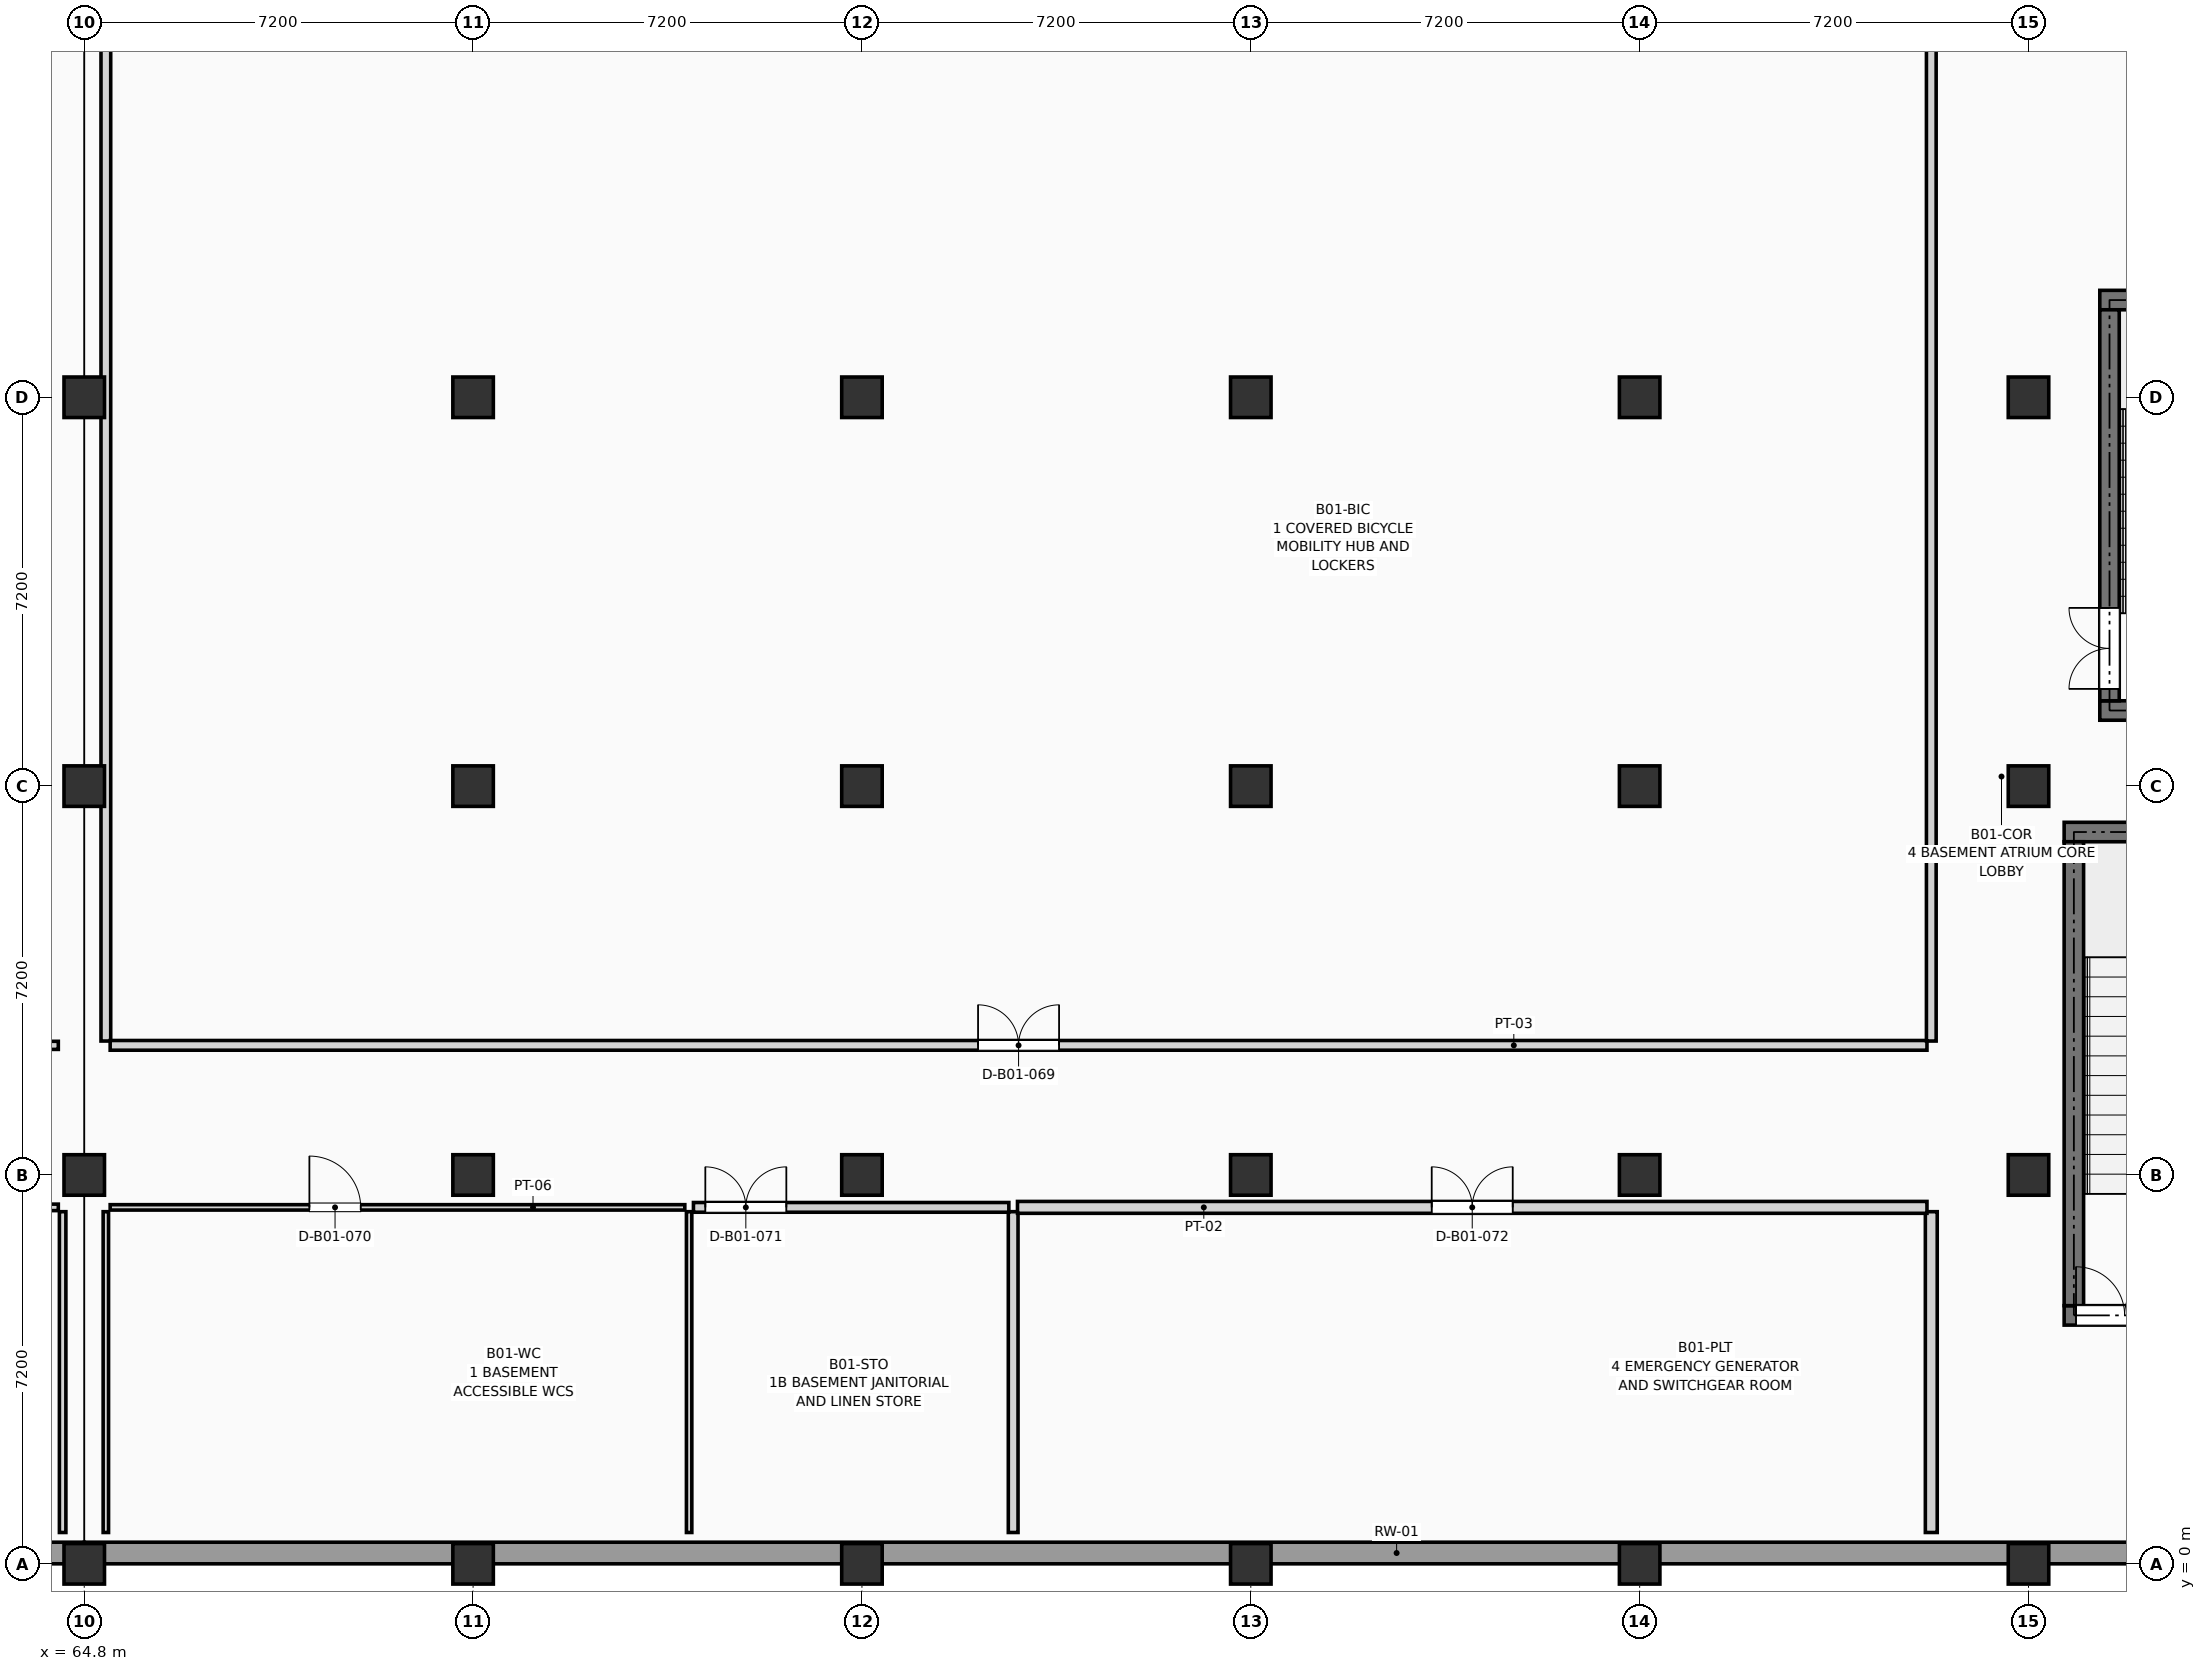
"""IFC4 building model, lengths in metres.
Left out: names, types, materials, properties, quantities, classifications, styles, units other than length and angle.
Written with IfcOpenShell. Run it as: python <this file> out.ifc"""

import sys

from ifc_helpers import new_model, si_unit, direction, frame, frame_2d, origin, origin_2d, place, context, subcontext, project, spatial, rectangle, extrude, element, fill, save


model = new_model("IFC4")
c1 = context("Model", 3, precision=1e-05, world=origin(), true_north=direction((0.0, 1.0)))
c2 = subcontext(c1, "Body", "Model", "MODEL_VIEW")
j1 = project(units=[si_unit("LENGTHUNIT", "METRE"), si_unit("PLANEANGLEUNIT", "RADIAN")], contexts=[c1])
p1 = place(None, origin())
s1 = spatial("IfcSite", under=j1, at=p1, CompositionType="ELEMENT")
p2 = place(p1, origin())
s2 = spatial("IfcBuilding", under=s1, at=p2, CompositionType="ELEMENT")
p3 = place(p2, frame((0.0, 0.0, -4.5)))
s3 = spatial("IfcBuildingStorey", under=s2, at=p3, CompositionType="ELEMENT", Elevation=-4.5)
for number, where, z_axis, x_axis in (
    (1, (64.8, 0.0, -0.3), (0.0, 0.0, 1.0), (1.0, 0.0, 0.0)),
    (2, (64.8, 7.2, -0.3), (0.0, 0.0, 1.0), (1.0, 0.0, 0.0)),
    (3, (64.8, 14.4, -0.3), (0.0, 0.0, 1.0), (1.0, 0.0, 0.0)),
    (4, (64.8, 21.6, -0.3), (0.0, 0.0, 1.0), (1.0, 0.0, 0.0)),
    (5, (72.0, 0.0, -0.3), (0.0, 0.0, 1.0), (1.0, 0.0, 0.0)),
    (6, (72.0, 7.2, -0.3), (0.0, 0.0, 1.0), (1.0, 0.0, 0.0)),
    (7, (72.0, 14.4, -0.3), (0.0, 0.0, 1.0), (1.0, 0.0, 0.0)),
    (8, (72.0, 21.6, -0.3), (0.0, 0.0, 1.0), (1.0, 0.0, 0.0)),
    (9, (79.2, 0.0, -0.3), (0.0, 0.0, 1.0), (1.0, 0.0, 0.0)),
    (10, (79.2, 7.2, -0.3), (0.0, 0.0, 1.0), (1.0, 0.0, 0.0)),
    (11, (79.2, 14.4, -0.3), (0.0, 0.0, 1.0), (1.0, 0.0, 0.0)),
    (12, (79.2, 21.6, -0.3), (0.0, 0.0, 1.0), (1.0, 0.0, 0.0)),
    (13, (86.4, 0.0, -0.3), (0.0, 0.0, 1.0), (1.0, 0.0, 0.0)),
    (14, (86.4, 7.2, -0.3), (0.0, 0.0, 1.0), (1.0, 0.0, 0.0)),
    (15, (86.4, 14.4, -0.3), (0.0, 0.0, 1.0), (1.0, 0.0, 0.0)),
    (16, (86.4, 21.6, -0.3), (0.0, 0.0, 1.0), (1.0, 0.0, 0.0)),
    (17, (93.6, 0.0, -0.3), (0.0, 0.0, 1.0), (1.0, 0.0, 0.0)),
    (18, (93.6, 7.2, -0.3), (0.0, 0.0, 1.0), (1.0, 0.0, 0.0)),
    (19, (93.6, 14.4, -0.3), (0.0, 0.0, 1.0), (1.0, 0.0, 0.0)),
    (20, (93.6, 21.6, -0.3), (0.0, 0.0, 1.0), (1.0, 0.0, 0.0)),
    (21, (100.8, 0.0, -0.3), (0.0, 0.0, 1.0), (1.0, 0.0, 0.0)),
):
    element("IfcColumn", number, at=place(p3, frame(where, z_axis=z_axis, x_axis=x_axis)), inside=s3, PredefinedType="COLUMN", context=c2, shape_type="SweptSolid", body=[
        extrude(rectangle(XDim=0.75, YDim=0.75, at=origin_2d()), origin(), (0.0, 0.0, 1.0), 4.8),
    ])
for number, where, z_axis, x_axis in (
    (22, (100.8, 7.2, 0.0), (0.0, 0.0, 1.0), (1.0, 0.0, 0.0)),
    (23, (100.8, 14.4, 0.0), (0.0, 0.0, 1.0), (1.0, 0.0, 0.0)),
    (24, (100.8, 21.6, 0.0), (0.0, 0.0, 1.0), (1.0, 0.0, 0.0)),
):
    element("IfcColumn", number, at=place(p3, frame(where, z_axis=z_axis, x_axis=x_axis)), inside=s3, PredefinedType="COLUMN", context=c2, shape_type="SweptSolid", body=[
        extrude(rectangle(XDim=0.75, YDim=0.75, at=origin_2d()), origin(), (0.0, 0.0, 1.0), 4.5),
    ])
p4 = place(p3, frame((115.2, 0.2, -0.3), z_axis=(0.0, 0.0, 1.0), x_axis=(-1.0, 0.0, 0.0)))
e25 = element("IfcWall", 25, at=p4, inside=s3, PredefinedType="USERDEFINED", context=c2, shape_type="SweptSolid", body=[
    extrude(rectangle(XDim=50.4, YDim=0.4, at=frame_2d((25.2, 0.0))), origin(), (0.0, 0.0, 1.0), 4.54),
])
p5 = place(p3, frame((64.8, 0.2, -0.3), z_axis=(0.0, 0.0, 1.0), x_axis=(-1.0, 0.0, 0.0)))
e26 = element("IfcWall", 26, at=p5, inside=s3, PredefinedType="USERDEFINED", context=c2, shape_type="SweptSolid", body=[
    extrude(rectangle(XDim=36.0, YDim=0.4, at=frame_2d((18.0, 0.0))), origin(), (0.0, 0.0, 1.0), 4.54),
])
for number, where, z_axis, x_axis in (
    (27, (102.12, 15.8, -0.3), (0.0, 0.0, 1.0), (1.0, 0.0, 0.0)),
    (28, (102.12, 23.4, -0.3), (0.0, 0.0, 1.0), (1.0, 0.0, 0.0)),
):
    element("IfcWall", number, at=place(p3, frame(where, z_axis=z_axis, x_axis=x_axis)), inside=s3, PredefinedType="SHEAR", context=c2, shape_type="SweptSolid", body=[
        extrude(rectangle(XDim=4.48, YDim=0.36, at=frame_2d((2.24, 0.0))), origin(), (0.0, 0.0, 1.0), 4.54),
    ])
p6 = place(p3, frame((102.3, 15.98, -0.3), z_axis=(0.0, 0.0, 1.0), x_axis=(0.0, 1.0, 0.0)))
e29 = element("IfcWall", 29, at=p6, inside=s3, PredefinedType="SHEAR", context=c2, shape_type="SweptSolid", body=[
    extrude(rectangle(XDim=7.24, YDim=0.36, at=frame_2d((3.62, 0.0))), origin(), (0.0, 0.0, 1.0), 4.54),
])
p7 = place(p6, frame((0.22, 0.0, 0.3)))
e30 = element("IfcOpeningElement", 30, at=p7, cuts=e29, PredefinedType="OPENING", context=c2, shape_type="SweptSolid", body=[
    extrude(rectangle(XDim=1.5, YDim=2.2, at=frame_2d((0.75, 1.1))), frame((0.0, 0.192, 0.0), z_axis=(0.0, -1.0, 0.0), x_axis=(1.0, 0.0, 0.0)), (0.0, 0.0, 1.0), 0.384),
])
p8 = place(p3, frame((101.46, 4.6, -0.3), z_axis=(0.0, 0.0, 1.0), x_axis=(1.0, 0.0, 0.0)))
e31 = element("IfcWall", 31, at=p8, inside=s3, PredefinedType="SHEAR", context=c2, shape_type="SweptSolid", body=[
    extrude(rectangle(XDim=5.88, YDim=0.36, at=frame_2d((2.94, 0.0))), origin(), (0.0, 0.0, 1.0), 4.54),
])
p9 = place(p8, frame((0.22, 0.0, 0.3)))
e32 = element("IfcOpeningElement", 32, at=p9, cuts=e31, PredefinedType="OPENING", context=c2, shape_type="SweptSolid", body=[
    extrude(rectangle(XDim=1.8, YDim=2.2, at=frame_2d((0.9, 1.1))), frame((0.0, 0.192, 0.0), z_axis=(0.0, -1.0, 0.0), x_axis=(1.0, 0.0, 0.0)), (0.0, 0.0, 1.0), 0.384),
])
p10 = place(p3, frame((101.46, 13.55, -0.3), z_axis=(0.0, 0.0, 1.0), x_axis=(1.0, 0.0, 0.0)))
e33 = element("IfcWall", 33, at=p10, inside=s3, PredefinedType="SHEAR", context=c2, shape_type="SweptSolid", body=[
    extrude(rectangle(XDim=5.88, YDim=0.36, at=frame_2d((2.94, 0.0))), origin(), (0.0, 0.0, 1.0), 4.54),
])
p11 = place(p3, frame((101.64, 4.78, -0.3), z_axis=(0.0, 0.0, 1.0), x_axis=(0.0, 1.0, 0.0)))
e34 = element("IfcWall", 34, at=p11, inside=s3, PredefinedType="SHEAR", context=c2, shape_type="SweptSolid", body=[
    extrude(rectangle(XDim=8.59, YDim=0.36, at=frame_2d((4.295, 0.0))), origin(), (0.0, 0.0, 1.0), 4.54),
])
p12 = place(p3, frame((46.88, 9.6, 0.0), z_axis=(0.0, 0.0, 1.0), x_axis=(1.0, 0.0, 0.0)))
e35 = element("IfcWall", 35, at=p12, inside=s3, PredefinedType="PARTITIONING", context=c2, shape_type="SweptSolid", body=[
    extrude(rectangle(XDim=17.44, YDim=0.15, at=frame_2d((8.72, 0.0))), origin(), (0.0, 0.0, 1.0), 4.225),
])
p13 = place(p12, frame((7.97, 0.0, 0.0)))
e36 = element("IfcOpeningElement", 36, at=p13, cuts=e35, PredefinedType="OPENING", context=c2, shape_type="SweptSolid", body=[
    extrude(rectangle(XDim=1.5, YDim=2.2, at=frame_2d((0.75, 1.1))), frame((0.0, 0.087, 0.0), z_axis=(0.0, -1.0, 0.0), x_axis=(1.0, 0.0, 0.0)), (0.0, 0.0, 1.0), 0.174),
])
p14 = place(p3, frame((64.4, 0.58, 0.0), z_axis=(0.0, 0.0, 1.0), x_axis=(0.0, 1.0, 0.0)))
e37 = element("IfcWall", 37, at=p14, inside=s3, PredefinedType="PARTITIONING", context=c2, shape_type="SweptSolid", body=[
    extrude(rectangle(XDim=5.94, YDim=0.12, at=frame_2d((2.97, 0.0))), origin(), (0.0, 0.0, 1.0), 3.375),
])
p15 = place(p3, frame((15.88, 6.6, 0.0), z_axis=(0.0, 0.0, 1.0), x_axis=(1.0, 0.0, 0.0)))
e38 = element("IfcWall", 38, at=p15, inside=s3, PredefinedType="PARTITIONING", context=c2, shape_type="SweptSolid", body=[
    extrude(rectangle(XDim=48.44, YDim=0.12, at=frame_2d((24.22, 0.0))), origin(), (0.0, 0.0, 1.0), 4.225),
])
p16 = place(p3, frame((65.2, 9.68, 0.0), z_axis=(0.0, 0.0, 1.0), x_axis=(0.0, 1.0, 0.0)))
e39 = element("IfcWall", 39, at=p16, inside=s3, PredefinedType="PARTITIONING", context=c2, shape_type="SweptSolid", body=[
    extrude(rectangle(XDim=18.44, YDim=0.18, at=frame_2d((9.22, 0.0))), origin(), (0.0, 0.0, 1.0), 3.375),
])
p17 = place(p3, frame((65.28, 9.6, 0.0), z_axis=(0.0, 0.0, 1.0), x_axis=(1.0, 0.0, 0.0)))
e40 = element("IfcWall", 40, at=p17, inside=s3, PredefinedType="PARTITIONING", context=c2, shape_type="SweptSolid", body=[
    extrude(rectangle(XDim=33.64, YDim=0.18, at=frame_2d((16.82, 0.0))), origin(), (0.0, 0.0, 1.0), 4.225),
])
p18 = place(p17, frame((16.07, 0.0, 0.0)))
e41 = element("IfcOpeningElement", 41, at=p18, cuts=e40, PredefinedType="OPENING", context=c2, shape_type="SweptSolid", body=[
    extrude(rectangle(XDim=1.5, YDim=2.25, at=frame_2d((0.75, 1.125))), frame((0.0, 0.102, 0.0), z_axis=(0.0, -1.0, 0.0), x_axis=(1.0, 0.0, 0.0)), (0.0, 0.0, 1.0), 0.204),
])
p19 = place(p3, frame((99.0, 9.68, 0.0), z_axis=(0.0, 0.0, 1.0), x_axis=(0.0, 1.0, 0.0)))
e42 = element("IfcWall", 42, at=p19, inside=s3, PredefinedType="PARTITIONING", context=c2, shape_type="SweptSolid", body=[
    extrude(rectangle(XDim=18.44, YDim=0.18, at=frame_2d((9.22, 0.0))), origin(), (0.0, 0.0, 1.0), 4.225),
])
p20 = place(p3, frame((65.2, 0.58, 0.0), z_axis=(0.0, 0.0, 1.0), x_axis=(0.0, 1.0, 0.0)))
e43 = element("IfcWall", 43, at=p20, inside=s3, PredefinedType="PARTITIONING", context=c2, shape_type="SweptSolid", body=[
    extrude(rectangle(XDim=5.94, YDim=0.1, at=frame_2d((2.97, 0.0))), origin(), (0.0, 0.0, 1.0), 3.375),
])
p21 = place(p3, frame((76.0, 0.58, 0.0), z_axis=(0.0, 0.0, 1.0), x_axis=(0.0, 1.0, 0.0)))
e44 = element("IfcWall", 44, at=p21, inside=s3, PredefinedType="PARTITIONING", context=c2, shape_type="SweptSolid", body=[
    extrude(rectangle(XDim=5.94, YDim=0.1, at=frame_2d((2.97, 0.0))), origin(), (0.0, 0.0, 1.0), 4.225),
])
p22 = place(p3, frame((65.28, 6.6, 0.0), z_axis=(0.0, 0.0, 1.0), x_axis=(1.0, 0.0, 0.0)))
e45 = element("IfcWall", 45, at=p22, inside=s3, PredefinedType="PARTITIONING", context=c2, shape_type="SweptSolid", body=[
    extrude(rectangle(XDim=10.64, YDim=0.1, at=frame_2d((5.32, 0.0))), origin(), (0.0, 0.0, 1.0), 4.225),
])
p23 = place(p22, frame((3.689, 0.0, 0.0)))
e46 = element("IfcOpeningElement", 46, at=p23, cuts=e45, PredefinedType="OPENING", context=c2, shape_type="SweptSolid", body=[
    extrude(rectangle(XDim=0.95, YDim=2.1, at=frame_2d((0.475, 1.05))), frame((0.0, 0.062, 0.0), z_axis=(0.0, -1.0, 0.0), x_axis=(1.0, 0.0, 0.0)), (0.0, 0.0, 1.0), 0.124),
])
p24 = place(p3, frame((82.0, 0.58, 0.0), z_axis=(0.0, 0.0, 1.0), x_axis=(0.0, 1.0, 0.0)))
e47 = element("IfcWall", 47, at=p24, inside=s3, PredefinedType="PARTITIONING", context=c2, shape_type="SweptSolid", body=[
    extrude(rectangle(XDim=5.94, YDim=0.18, at=frame_2d((2.97, 0.0))), origin(), (0.0, 0.0, 1.0), 4.225),
])
p25 = place(p3, frame((76.08, 6.6, 0.0), z_axis=(0.0, 0.0, 1.0), x_axis=(1.0, 0.0, 0.0)))
e48 = element("IfcWall", 48, at=p25, inside=s3, PredefinedType="PARTITIONING", context=c2, shape_type="SweptSolid", body=[
    extrude(rectangle(XDim=5.84, YDim=0.18, at=frame_2d((2.92, 0.0))), origin(), (0.0, 0.0, 1.0), 4.225),
])
p26 = place(p25, frame((0.22, 0.0, 0.0)))
e49 = element("IfcOpeningElement", 49, at=p26, cuts=e48, PredefinedType="OPENING", context=c2, shape_type="SweptSolid", body=[
    extrude(rectangle(XDim=1.5, YDim=2.25, at=frame_2d((0.75, 1.125))), frame((0.0, 0.102, 0.0), z_axis=(0.0, -1.0, 0.0), x_axis=(1.0, 0.0, 0.0)), (0.0, 0.0, 1.0), 0.204),
])
p27 = place(p3, frame((99.0, 0.58, 0.0), z_axis=(0.0, 0.0, 1.0), x_axis=(0.0, 1.0, 0.0)))
e50 = element("IfcWall", 50, at=p27, inside=s3, PredefinedType="PARTITIONING", context=c2, shape_type="SweptSolid", body=[
    extrude(rectangle(XDim=5.94, YDim=0.22, at=frame_2d((2.97, 0.0))), origin(), (0.0, 0.0, 1.0), 4.225),
])
p28 = place(p3, frame((82.08, 6.6, 0.0), z_axis=(0.0, 0.0, 1.0), x_axis=(1.0, 0.0, 0.0)))
e51 = element("IfcWall", 51, at=p28, inside=s3, PredefinedType="PARTITIONING", context=c2, shape_type="SweptSolid", body=[
    extrude(rectangle(XDim=16.84, YDim=0.22, at=frame_2d((8.42, 0.0))), origin(), (0.0, 0.0, 1.0), 4.225),
])
p29 = place(p28, frame((7.67, 0.0, 0.0)))
e52 = element("IfcOpeningElement", 52, at=p29, cuts=e51, PredefinedType="OPENING", context=c2, shape_type="SweptSolid", body=[
    extrude(rectangle(XDim=1.5, YDim=2.25, at=frame_2d((0.75, 1.125))), frame((0.0, 0.122, 0.0), z_axis=(0.0, -1.0, 0.0), x_axis=(1.0, 0.0, 0.0)), (0.0, 0.0, 1.0), 0.244),
])
p30 = place(p7, origin())
e53 = element("IfcDoor", 53, at=p30, inside=s3, OperationType="DOUBLE_DOOR_SINGLE_SWING", PredefinedType="DOOR", context=c2, shape_type="SweptSolid", body=[
    extrude(rectangle(XDim=1.5, YDim=2.2, at=frame_2d((0.75, 1.1))), frame((0.0, 0.025, 0.0), z_axis=(0.0, -1.0, 0.0), x_axis=(1.0, 0.0, 0.0)), (0.0, 0.0, 1.0), 0.05),
])
fill(e30, e53)
p31 = place(p9, origin())
e54 = element("IfcDoor", 54, at=p31, inside=s3, OperationType="DOUBLE_DOOR_SINGLE_SWING", PredefinedType="DOOR", context=c2, shape_type="SweptSolid", body=[
    extrude(rectangle(XDim=1.8, YDim=2.2, at=frame_2d((0.9, 1.1))), frame((0.0, 0.025, 0.0), z_axis=(0.0, -1.0, 0.0), x_axis=(1.0, 0.0, 0.0)), (0.0, 0.0, 1.0), 0.05),
])
fill(e32, e54)
p32 = place(p18, origin())
e55 = element("IfcDoor", 55, at=p32, inside=s3, OperationType="DOUBLE_DOOR_SINGLE_SWING", PredefinedType="DOOR", context=c2, shape_type="SweptSolid", body=[
    extrude(rectangle(XDim=1.5, YDim=2.25, at=frame_2d((0.75, 1.125))), frame((0.0, 0.025, 0.0), z_axis=(0.0, -1.0, 0.0), x_axis=(1.0, 0.0, 0.0)), (0.0, 0.0, 1.0), 0.05),
])
fill(e41, e55)
p33 = place(p23, origin())
e56 = element("IfcDoor", 56, at=p33, inside=s3, OperationType="SINGLE_SWING_LEFT", PredefinedType="DOOR", context=c2, shape_type="SweptSolid", body=[
    extrude(rectangle(XDim=0.95, YDim=2.1, at=frame_2d((0.475, 1.05))), frame((0.0, 0.025, 0.0), z_axis=(0.0, -1.0, 0.0), x_axis=(1.0, 0.0, 0.0)), (0.0, 0.0, 1.0), 0.05),
])
fill(e46, e56)
p34 = place(p26, origin())
e57 = element("IfcDoor", 57, at=p34, inside=s3, OperationType="DOUBLE_DOOR_SINGLE_SWING", PredefinedType="DOOR", context=c2, shape_type="SweptSolid", body=[
    extrude(rectangle(XDim=1.5, YDim=2.25, at=frame_2d((0.75, 1.125))), frame((0.0, 0.025, 0.0), z_axis=(0.0, -1.0, 0.0), x_axis=(1.0, 0.0, 0.0)), (0.0, 0.0, 1.0), 0.05),
])
fill(e49, e57)
p35 = place(p29, origin())
e58 = element("IfcDoor", 58, at=p35, inside=s3, OperationType="DOUBLE_DOOR_SINGLE_SWING", PredefinedType="DOOR", context=c2, shape_type="SweptSolid", body=[
    extrude(rectangle(XDim=1.5, YDim=2.25, at=frame_2d((0.75, 1.125))), frame((0.0, 0.025, 0.0), z_axis=(0.0, -1.0, 0.0), x_axis=(1.0, 0.0, 0.0)), (0.0, 0.0, 1.0), 0.05),
])
fill(e52, e58)
save(model, sys.argv[1])
